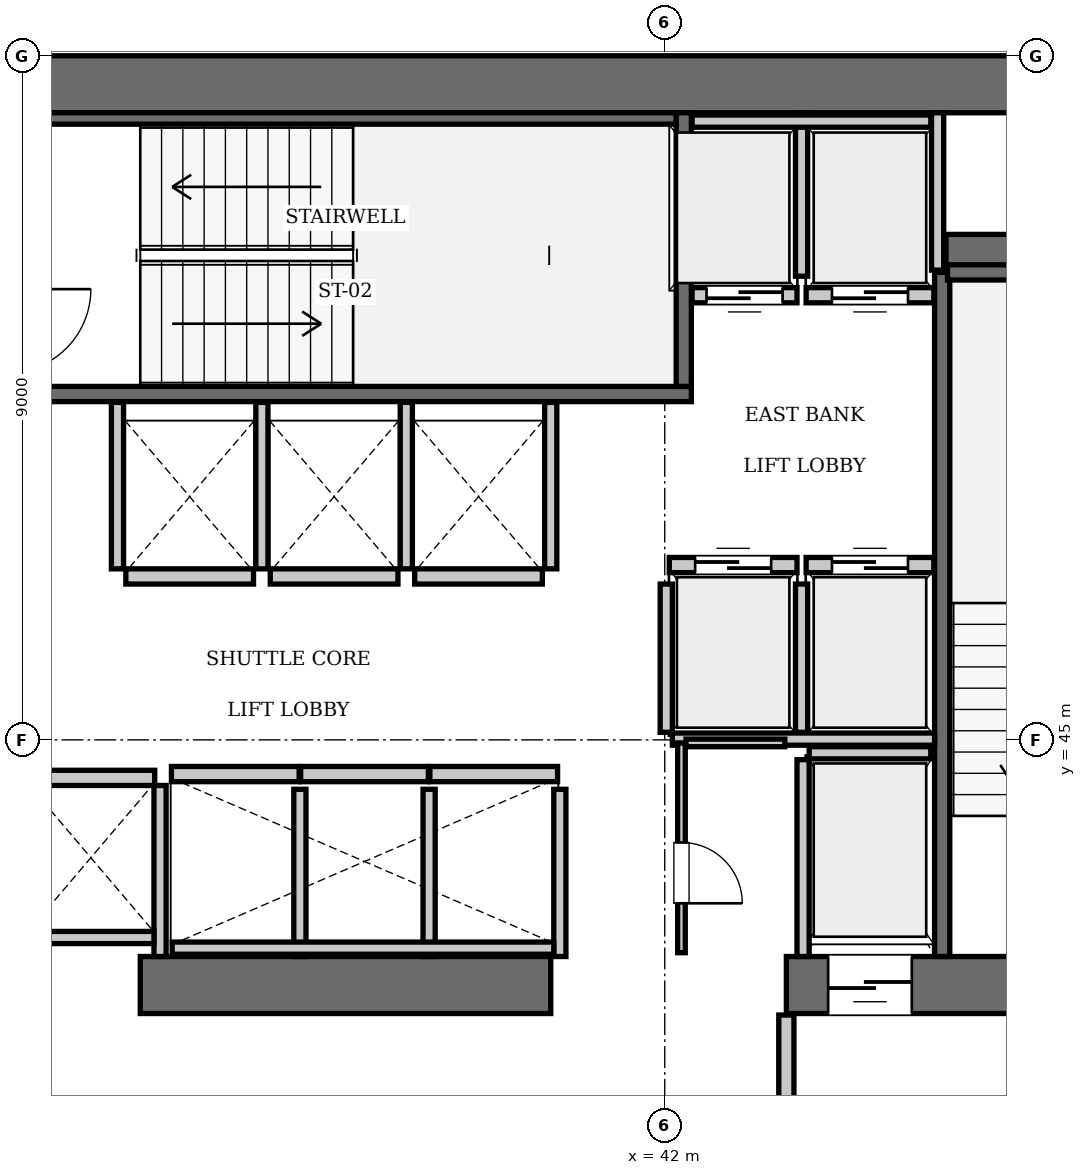
"""IFC4 building model, lengths in metres.
Left out: names, types, materials, properties, quantities, classifications, styles, units other than length and angle.
Written with IfcOpenShell. Run it as: python <this file> out.ifc"""

import sys

from ifc_helpers import new_model, si_unit, direction, frame, frame_2d, origin, place, context, subcontext, project, spatial, rectangle, extrude, element, fill, save


model = new_model("IFC4")
c1 = context("Model", 3, precision=1e-05, world=origin(), true_north=direction((0.0, 1.0)))
c2 = subcontext(c1, "Body", "Model", "MODEL_VIEW")
j1 = project(units=[si_unit("LENGTHUNIT", "METRE"), si_unit("PLANEANGLEUNIT", "RADIAN")], contexts=[c1])
p1 = place(None, origin())
s1 = spatial("IfcSite", under=j1, at=p1, CompositionType="ELEMENT")
p2 = place(p1, origin())
s2 = spatial("IfcBuilding", under=s1, at=p2, CompositionType="ELEMENT")
p3 = place(p2, frame((0.0, 0.0, 154.35)))
s3 = spatial("IfcBuildingStorey", under=s2, at=p3, CompositionType="ELEMENT", Elevation=154.35)
p4 = place(p3, frame((25.2, 53.625, 0.0), z_axis=(0.0, 0.0, 1.0), x_axis=(1.0, 0.0, 0.0)))
e1 = element("IfcWall", 1, at=p4, inside=s3, PredefinedType="SHEAR", context=c2, shape_type="SweptSolid", body=[
    extrude(rectangle(XDim=25.2, YDim=0.75, at=frame_2d((12.6, 0.0))), origin(), (0.0, 0.0, 1.0), 3.85),
])
p5 = place(p3, frame((35.1, 41.775, 0.0), z_axis=(0.0, 0.0, 1.0), x_axis=(1.0, 0.0, 0.0)))
e2 = element("IfcWall", 2, at=p5, inside=s3, PredefinedType="SHEAR", context=c2, shape_type="SweptSolid", body=[
    extrude(rectangle(XDim=5.4, YDim=0.75, at=frame_2d((2.7, 0.0))), origin(), (0.0, 0.0, 1.0), 3.85),
])
p6 = place(p3, frame((43.6, 41.775, 0.0), z_axis=(0.0, 0.0, 1.0), x_axis=(1.0, 0.0, 0.0)))
e3 = element("IfcWall", 3, at=p6, inside=s3, PredefinedType="SHEAR", context=c2, shape_type="SweptSolid", body=[
    extrude(rectangle(XDim=6.8, YDim=0.75, at=frame_2d((3.4, 0.0))), origin(), (0.0, 0.0, 1.0), 3.85),
])
p7 = place(p6, frame((3.9, 0.0, 0.0)))
e4 = element("IfcOpeningElement", 4, at=p7, cuts=e3, PredefinedType="OPENING", context=c2, shape_type="SweptSolid", body=[
    extrude(rectangle(XDim=1.15, YDim=2.15, at=frame_2d((0.575, 1.075))), frame((0.0, 0.385, 0.0), z_axis=(0.0, -1.0, 0.0), x_axis=(1.0, 0.0, 0.0)), (0.0, 0.0, 1.0), 0.77),
])
p8 = place(p6, frame((0.55, 0.0, 0.0)))
e5 = element("IfcOpeningElement", 5, at=p8, cuts=e3, PredefinedType="OPENING", context=c2, shape_type="SweptSolid", body=[
    extrude(rectangle(XDim=1.1, YDim=2.2, at=frame_2d((0.55, 1.1))), frame((0.0, 0.385, 0.0), z_axis=(0.0, -1.0, 0.0), x_axis=(1.0, 0.0, 0.0)), (0.0, 0.0, 1.0), 0.77),
])
p9 = place(p3, frame((45.7, 51.4, 0.0), z_axis=(0.0, 0.0, 1.0), x_axis=(1.0, 0.0, 0.0)))
e6 = element("IfcWall", 6, at=p9, inside=s3, PredefinedType="SHEAR", context=c2, shape_type="SweptSolid", body=[
    extrude(rectangle(XDim=3.95, YDim=0.5, at=frame_2d((1.975, 0.0))), origin(), (0.0, 0.0, 1.0), 3.85),
])
p10 = place(p3, frame((33.25, 49.55, 0.0), z_axis=(0.0, 0.0, 1.0), x_axis=(1.0, 0.0, 0.0)))
e7 = element("IfcWall", 7, at=p10, inside=s3, PredefinedType="SOLIDWALL", context=c2, shape_type="SweptSolid", body=[
    extrude(rectangle(XDim=9.1, YDim=0.2, at=frame_2d((4.55, 0.0))), origin(), (0.0, 0.0, 1.0), 3.61),
])
p11 = place(p3, frame((42.25, 49.65, 0.0), z_axis=(0.0, 0.0, 1.0), x_axis=(0.0, 1.0, 0.0)))
e8 = element("IfcWall", 8, at=p11, inside=s3, PredefinedType="SOLIDWALL", context=c2, shape_type="SweptSolid", body=[
    extrude(rectangle(XDim=3.6, YDim=0.2, at=frame_2d((1.8, 0.0))), origin(), (0.0, 0.0, 1.0), 3.61),
])
p12 = place(p3, frame((33.45, 53.175, 0.0), z_axis=(0.0, 0.0, 1.0), x_axis=(1.0, 0.0, 0.0)))
e9 = element("IfcWall", 9, at=p12, inside=s3, PredefinedType="SOLIDWALL", context=c2, shape_type="SweptSolid", body=[
    extrude(rectangle(XDim=8.7, YDim=0.15, at=frame_2d((4.35, 0.0))), origin(), (0.0, 0.0, 1.0), 3.61),
])
p13 = place(p3, frame((45.65, 42.15, 0.0), z_axis=(0.0, 0.0, 1.0), x_axis=(0.0, 1.0, 0.0)))
e10 = element("IfcWall", 10, at=p13, inside=s3, PredefinedType="SOLIDWALL", context=c2, shape_type="SweptSolid", body=[
    extrude(rectangle(XDim=9.0, YDim=0.2, at=frame_2d((4.5, 0.0))), origin(), (0.0, 0.0, 1.0), 3.61),
])
p14 = place(p3, frame((45.72, 51.15, 0.0), z_axis=(0.0, 0.0, 1.0), x_axis=(1.0, 0.0, 0.0)))
e11 = element("IfcWall", 11, at=p14, inside=s3, PredefinedType="SOLIDWALL", context=c2, shape_type="SweptSolid", body=[
    extrude(rectangle(XDim=3.5, YDim=0.2, at=frame_2d((1.75, 0.0))), origin(), (0.0, 0.0, 1.0), 3.61),
])
p15 = place(p3, frame((42.06, 47.3, 0.0), z_axis=(0.0, 0.0, 1.0), x_axis=(1.0, 0.0, 0.0)))
e12 = element("IfcWall", 12, at=p15, inside=s3, PredefinedType="SOLIDWALL", context=c2, shape_type="SweptSolid", body=[
    extrude(rectangle(XDim=1.68, YDim=0.2, at=frame_2d((0.84, 0.0))), origin(), (0.0, 0.0, 1.0), 3.61),
])
p16 = place(p15, frame((0.34, 0.0, 0.0)))
e13 = element("IfcOpeningElement", 13, at=p16, cuts=e12, PredefinedType="OPENING", context=c2, shape_type="SweptSolid", body=[
    extrude(rectangle(XDim=1.0, YDim=2.15, at=frame_2d((0.5, 1.075))), frame((0.0, 0.11, 0.0), z_axis=(0.0, -1.0, 0.0), x_axis=(1.0, 0.0, 0.0)), (0.0, 0.0, 1.0), 0.22),
])
p17 = place(p3, frame((43.86, 47.3, 0.0), z_axis=(0.0, 0.0, 1.0), x_axis=(1.0, 0.0, 0.0)))
e14 = element("IfcWall", 14, at=p17, inside=s3, PredefinedType="SOLIDWALL", context=c2, shape_type="SweptSolid", body=[
    extrude(rectangle(XDim=1.68, YDim=0.2, at=frame_2d((0.84, 0.0))), origin(), (0.0, 0.0, 1.0), 3.61),
])
p18 = place(p17, frame((0.34, 0.0, 0.0)))
e15 = element("IfcOpeningElement", 15, at=p18, cuts=e14, PredefinedType="OPENING", context=c2, shape_type="SweptSolid", body=[
    extrude(rectangle(XDim=1.0, YDim=2.15, at=frame_2d((0.5, 1.075))), frame((0.0, 0.11, 0.0), z_axis=(0.0, -1.0, 0.0), x_axis=(1.0, 0.0, 0.0)), (0.0, 0.0, 1.0), 0.22),
])
p19 = place(p3, frame((42.36, 50.85, 0.0), z_axis=(0.0, 0.0, 1.0), x_axis=(1.0, 0.0, 0.0)))
e16 = element("IfcWall", 16, at=p19, inside=s3, PredefinedType="SOLIDWALL", context=c2, shape_type="SweptSolid", body=[
    extrude(rectangle(XDim=1.38, YDim=0.2, at=frame_2d((0.69, 0.0))), origin(), (0.0, 0.0, 1.0), 3.61),
])
p20 = place(p19, frame((0.19, 0.0, 0.0)))
e17 = element("IfcOpeningElement", 17, at=p20, cuts=e16, PredefinedType="OPENING", context=c2, shape_type="SweptSolid", body=[
    extrude(rectangle(XDim=1.0, YDim=2.15, at=frame_2d((0.5, 1.075))), frame((0.0, 0.11, 0.0), z_axis=(0.0, -1.0, 0.0), x_axis=(1.0, 0.0, 0.0)), (0.0, 0.0, 1.0), 0.22),
])
p21 = place(p3, frame((43.86, 50.85, 0.0), z_axis=(0.0, 0.0, 1.0), x_axis=(1.0, 0.0, 0.0)))
e18 = element("IfcWall", 18, at=p21, inside=s3, PredefinedType="SOLIDWALL", context=c2, shape_type="SweptSolid", body=[
    extrude(rectangle(XDim=1.68, YDim=0.2, at=frame_2d((0.84, 0.0))), origin(), (0.0, 0.0, 1.0), 3.61),
])
p22 = place(p21, frame((0.34, 0.0, 0.0)))
e19 = element("IfcOpeningElement", 19, at=p22, cuts=e18, PredefinedType="OPENING", context=c2, shape_type="SweptSolid", body=[
    extrude(rectangle(XDim=1.0, YDim=2.15, at=frame_2d((0.5, 1.075))), frame((0.0, 0.11, 0.0), z_axis=(0.0, -1.0, 0.0), x_axis=(1.0, 0.0, 0.0)), (0.0, 0.0, 1.0), 0.22),
])
for number, where, z_axis, x_axis in (
    (20, (35.51, 44.55, 0.0), (0.0, 0.0, 1.0), (1.0, 0.0, 0.0)),
    (21, (37.21, 44.55, 0.0), (0.0, 0.0, 1.0), (1.0, 0.0, 0.0)),
):
    element("IfcWall", number, at=place(p3, frame(where, z_axis=z_axis, x_axis=x_axis)), inside=s3, PredefinedType="SOLIDWALL", context=c2, shape_type="SweptSolid", body=[
        extrude(rectangle(XDim=1.68, YDim=0.2, at=frame_2d((0.84, 0.0))), origin(), (0.0, 0.0, 1.0), 3.61),
    ])
for number, where, z_axis, x_axis in (
    (22, (38.91, 44.55, 0.0), (0.0, 0.0, 1.0), (1.0, 0.0, 0.0)),
    (23, (34.91, 47.15, 0.0), (0.0, 0.0, 1.0), (1.0, 0.0, 0.0)),
):
    element("IfcWall", number, at=place(p3, frame(where, z_axis=z_axis, x_axis=x_axis)), inside=s3, PredefinedType="SOLIDWALL", context=c2, shape_type="SweptSolid", body=[
        extrude(rectangle(XDim=1.68, YDim=0.2, at=frame_2d((0.84, 0.0))), origin(), (0.0, 0.0, 1.0), 3.61),
    ])
for number, where, z_axis, x_axis in (
    (24, (36.81, 47.15, 0.0), (0.0, 0.0, 1.0), (1.0, 0.0, 0.0)),
    (25, (38.71, 47.15, 0.0), (0.0, 0.0, 1.0), (1.0, 0.0, 0.0)),
    (26, (33.61, 44.5, 0.0), (0.0, 0.0, 1.0), (1.0, 0.0, 0.0)),
):
    element("IfcWall", number, at=place(p3, frame(where, z_axis=z_axis, x_axis=x_axis)), inside=s3, PredefinedType="SOLIDWALL", context=c2, shape_type="SweptSolid", body=[
        extrude(rectangle(XDim=1.68, YDim=0.2, at=frame_2d((0.84, 0.0))), origin(), (0.0, 0.0, 1.0), 3.61),
    ])
p23 = place(p3, frame((43.9, 44.83, 0.0), z_axis=(0.0, 0.0, 1.0), x_axis=(1.0, 0.0, 0.0)))
e27 = element("IfcWall", 27, at=p23, inside=s3, PredefinedType="SOLIDWALL", context=c2, shape_type="SweptSolid", body=[
    extrude(rectangle(XDim=1.6, YDim=0.16, at=frame_2d((0.8, 0.0))), origin(), (0.0, 0.0, 1.0), 3.61),
])
p24 = place(p3, frame((43.82, 42.15, 0.0), z_axis=(0.0, 0.0, 1.0), x_axis=(0.0, 1.0, 0.0)))
e28 = element("IfcWall", 28, at=p24, inside=s3, PredefinedType="SOLIDWALL", context=c2, shape_type="SweptSolid", body=[
    extrude(rectangle(XDim=2.59, YDim=0.16, at=frame_2d((1.295, 0.0))), origin(), (0.0, 0.0, 1.0), 3.61),
])
for number, where, z_axis, x_axis in (
    (29, (42.02, 45.1, 0.0), (0.0, 0.0, 1.0), (0.0, 1.0, 0.0)),
    (30, (43.8, 45.1, 0.0), (0.0, 0.0, 1.0), (0.0, 1.0, 0.0)),
):
    element("IfcWall", number, at=place(p3, frame(where, z_axis=z_axis, x_axis=x_axis)), inside=s3, PredefinedType="SOLIDWALL", context=c2, shape_type="SweptSolid", body=[
        extrude(rectangle(XDim=1.95, YDim=0.16, at=frame_2d((0.975, 0.0))), origin(), (0.0, 0.0, 1.0), 3.61),
    ])
p25 = place(p3, frame((42.1, 45.01, 0.0), z_axis=(0.0, 0.0, 1.0), x_axis=(1.0, 0.0, 0.0)))
e31 = element("IfcWall", 31, at=p25, inside=s3, PredefinedType="SOLIDWALL", context=c2, shape_type="SweptSolid", body=[
    extrude(rectangle(XDim=3.45, YDim=0.16, at=frame_2d((1.725, 0.0))), origin(), (0.0, 0.0, 1.0), 3.61),
])
p26 = place(p3, frame((45.59, 51.18, 0.0), z_axis=(0.0, 0.0, 1.0), x_axis=(0.0, 1.0, 0.0)))
e32 = element("IfcWall", 32, at=p26, inside=s3, PredefinedType="SOLIDWALL", context=c2, shape_type="SweptSolid", body=[
    extrude(rectangle(XDim=2.07, YDim=0.16, at=frame_2d((1.035, 0.0))), origin(), (0.0, 0.0, 1.0), 3.61),
])
p27 = place(p3, frame((43.8, 51.1, 0.0), z_axis=(0.0, 0.0, 1.0), x_axis=(0.0, 1.0, 0.0)))
e33 = element("IfcWall", 33, at=p27, inside=s3, PredefinedType="SOLIDWALL", context=c2, shape_type="SweptSolid", body=[
    extrude(rectangle(XDim=2.15, YDim=0.16, at=frame_2d((1.075, 0.0))), origin(), (0.0, 0.0, 1.0), 3.61),
])
p28 = place(p3, frame((42.36, 53.14, 0.0), z_axis=(0.0, 0.0, 1.0), x_axis=(1.0, 0.0, 0.0)))
e34 = element("IfcWall", 34, at=p28, inside=s3, PredefinedType="SOLIDWALL", context=c2, shape_type="SweptSolid", body=[
    extrude(rectangle(XDim=3.14, YDim=0.16, at=frame_2d((1.57, 0.0))), origin(), (0.0, 0.0, 1.0), 3.61),
])
for number, where, z_axis, x_axis in (
    (35, (37.2, 42.15, 0.0), (0.0, 0.0, 1.0), (0.0, 1.0, 0.0)),
    (36, (38.9, 42.15, 0.0), (0.0, 0.0, 1.0), (0.0, 1.0, 0.0)),
    (37, (40.62, 42.15, 0.0), (0.0, 0.0, 1.0), (0.0, 1.0, 0.0)),
):
    element("IfcWall", number, at=place(p3, frame(where, z_axis=z_axis, x_axis=x_axis)), inside=s3, PredefinedType="SOLIDWALL", context=c2, shape_type="SweptSolid", body=[
        extrude(rectangle(XDim=2.2, YDim=0.16, at=frame_2d((1.1, 0.0))), origin(), (0.0, 0.0, 1.0), 3.61),
    ])
p29 = place(p3, frame((35.52, 42.26, 0.0), z_axis=(0.0, 0.0, 1.0), x_axis=(1.0, 0.0, 0.0)))
e38 = element("IfcWall", 38, at=p29, inside=s3, PredefinedType="SOLIDWALL", context=c2, shape_type="SweptSolid", body=[
    extrude(rectangle(XDim=5.02, YDim=0.16, at=frame_2d((2.51, 0.0))), origin(), (0.0, 0.0, 1.0), 3.61),
])
for number, where, z_axis, x_axis in (
    (39, (34.8, 47.25, 0.0), (0.0, 0.0, 1.0), (0.0, 1.0, 0.0)),
    (40, (36.7, 47.25, 0.0), (0.0, 0.0, 1.0), (0.0, 1.0, 0.0)),
    (41, (38.6, 47.25, 0.0), (0.0, 0.0, 1.0), (0.0, 1.0, 0.0)),
    (42, (40.5, 47.25, 0.0), (0.0, 0.0, 1.0), (0.0, 1.0, 0.0)),
):
    element("IfcWall", number, at=place(p3, frame(where, z_axis=z_axis, x_axis=x_axis)), inside=s3, PredefinedType="SOLIDWALL", context=c2, shape_type="SweptSolid", body=[
        extrude(rectangle(XDim=2.19, YDim=0.16, at=frame_2d((1.095, 0.0))), origin(), (0.0, 0.0, 1.0), 3.61),
    ])
p30 = place(p3, frame((35.36, 42.15, 0.0), z_axis=(0.0, 0.0, 1.0), x_axis=(0.0, 1.0, 0.0)))
e43 = element("IfcWall", 43, at=p30, inside=s3, PredefinedType="SOLIDWALL", context=c2, shape_type="SweptSolid", body=[
    extrude(rectangle(XDim=2.25, YDim=0.16, at=frame_2d((1.125, 0.0))), origin(), (0.0, 0.0, 1.0), 3.61),
])
p31 = place(p3, frame((33.62, 42.4, 0.0), z_axis=(0.0, 0.0, 1.0), x_axis=(1.0, 0.0, 0.0)))
e44 = element("IfcWall", 44, at=p31, inside=s3, PredefinedType="SOLIDWALL", context=c2, shape_type="SweptSolid", body=[
    extrude(rectangle(XDim=1.66, YDim=0.16, at=frame_2d((0.83, 0.0))), origin(), (0.0, 0.0, 1.0), 3.61),
])
p32 = place(p3, frame((43.6, 38.31, 0.0), z_axis=(0.0, 0.0, 1.0), x_axis=(0.0, 1.0, 0.0)))
e45 = element("IfcWall", 45, at=p32, inside=s3, PredefinedType="PARTITIONING", context=c2, shape_type="SweptSolid", body=[
    extrude(rectangle(XDim=3.07, YDim=0.2, at=frame_2d((1.535, 0.0))), origin(), (0.0, 0.0, 1.0), 3.61),
])
p33 = place(p3, frame((42.22, 42.2, 0.0), z_axis=(0.0, 0.0, 1.0), x_axis=(0.0, 1.0, 0.0)))
e46 = element("IfcWall", 46, at=p33, inside=s3, PredefinedType="PARTITIONING", context=c2, shape_type="SweptSolid", body=[
    extrude(rectangle(XDim=2.76, YDim=0.1, at=frame_2d((1.38, 0.0))), origin(), (0.0, 0.0, 1.0), 3.61),
])
p34 = place(p33, frame((0.65, 0.0, 0.0)))
e47 = element("IfcOpeningElement", 47, at=p34, cuts=e46, PredefinedType="OPENING", context=c2, shape_type="SweptSolid", body=[
    extrude(rectangle(XDim=0.8, YDim=2.05, at=frame_2d((0.4, 1.025))), frame((0.0, 0.06, 0.0), z_axis=(0.0, -1.0, 0.0), x_axis=(1.0, 0.0, 0.0)), (0.0, 0.0, 1.0), 0.12),
])
p35 = place(p3, frame((42.28, 44.96, 0.0), z_axis=(0.0, 0.0, 1.0), x_axis=(1.0, 0.0, 0.0)))
e48 = element("IfcWall", 48, at=p35, inside=s3, PredefinedType="PARTITIONING", context=c2, shape_type="SweptSolid", body=[
    extrude(rectangle(XDim=1.3, YDim=0.1, at=frame_2d((0.65, 0.0))), origin(), (0.0, 0.0, 1.0), 3.61),
])
p36 = place(p16, origin())
e49 = element("IfcDoor", 49, at=p36, inside=s3, OperationType="SLIDING_TO_LEFT", PredefinedType="DOOR", context=c2, shape_type="SweptSolid", body=[
    extrude(rectangle(XDim=1.0, YDim=2.15, at=frame_2d((0.5, 1.075))), frame((0.0, 0.025, 0.0), z_axis=(0.0, -1.0, 0.0), x_axis=(1.0, 0.0, 0.0)), (0.0, 0.0, 1.0), 0.05),
])
fill(e13, e49)
p37 = place(p18, origin())
e50 = element("IfcDoor", 50, at=p37, inside=s3, OperationType="SLIDING_TO_LEFT", PredefinedType="DOOR", context=c2, shape_type="SweptSolid", body=[
    extrude(rectangle(XDim=1.0, YDim=2.15, at=frame_2d((0.5, 1.075))), frame((0.0, 0.025, 0.0), z_axis=(0.0, -1.0, 0.0), x_axis=(1.0, 0.0, 0.0)), (0.0, 0.0, 1.0), 0.05),
])
fill(e15, e50)
p38 = place(p20, frame((1.0, 0.0, 0.0), z_axis=(0.0, 0.0, 1.0), x_axis=(-1.0, 0.0, 0.0)))
e51 = element("IfcDoor", 51, at=p38, inside=s3, OperationType="SLIDING_TO_LEFT", PredefinedType="DOOR", context=c2, shape_type="SweptSolid", body=[
    extrude(rectangle(XDim=1.0, YDim=2.15, at=frame_2d((0.5, 1.075))), frame((0.0, 0.025, 0.0), z_axis=(0.0, -1.0, 0.0), x_axis=(1.0, 0.0, 0.0)), (0.0, 0.0, 1.0), 0.05),
])
fill(e17, e51)
p39 = place(p22, frame((1.0, 0.0, 0.0), z_axis=(0.0, 0.0, 1.0), x_axis=(-1.0, 0.0, 0.0)))
e52 = element("IfcDoor", 52, at=p39, inside=s3, OperationType="SLIDING_TO_LEFT", PredefinedType="DOOR", context=c2, shape_type="SweptSolid", body=[
    extrude(rectangle(XDim=1.0, YDim=2.15, at=frame_2d((0.5, 1.075))), frame((0.0, 0.025, 0.0), z_axis=(0.0, -1.0, 0.0), x_axis=(1.0, 0.0, 0.0)), (0.0, 0.0, 1.0), 0.05),
])
fill(e19, e52)
p40 = place(p8, frame((1.1, 0.0, 0.0), z_axis=(0.0, 0.0, 1.0), x_axis=(-1.0, 0.0, 0.0)))
e53 = element("IfcDoor", 53, at=p40, inside=s3, OperationType="SLIDING_TO_LEFT", PredefinedType="DOOR", context=c2, shape_type="SweptSolid", body=[
    extrude(rectangle(XDim=1.1, YDim=2.2, at=frame_2d((0.55, 1.1))), frame((0.0, 0.025, 0.0), z_axis=(0.0, -1.0, 0.0), x_axis=(1.0, 0.0, 0.0)), (0.0, 0.0, 1.0), 0.05),
])
fill(e5, e53)
p41 = place(p34, frame((0.8, 0.0, 0.0), z_axis=(0.0, 0.0, 1.0), x_axis=(-1.0, 0.0, 0.0)))
e54 = element("IfcDoor", 54, at=p41, inside=s3, OperationType="SINGLE_SWING_RIGHT", PredefinedType="DOOR", context=c2, shape_type="SweptSolid", body=[
    extrude(rectangle(XDim=0.8, YDim=2.05, at=frame_2d((0.4, 1.025))), frame((0.0, 0.025, 0.0), z_axis=(0.0, -1.0, 0.0), x_axis=(1.0, 0.0, 0.0)), (0.0, 0.0, 1.0), 0.05),
])
fill(e47, e54)
save(model, sys.argv[1])
